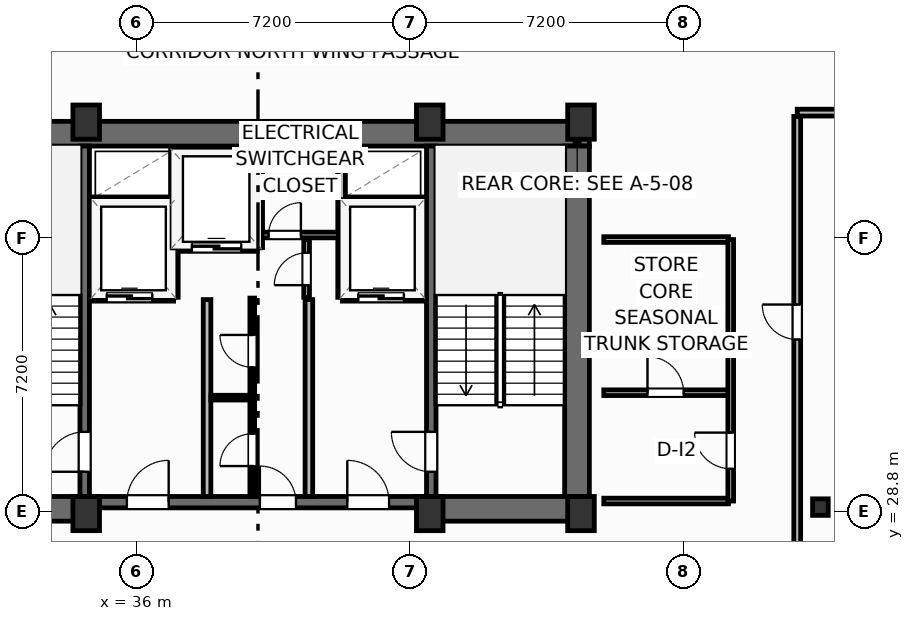
"""IFC4 building model, lengths in metres.
Left out: names, types, materials, properties, quantities, classifications, styles, units other than length and angle.
Written with IfcOpenShell. Run it as: python <this file> out.ifc"""

import sys

from ifc_helpers import new_model, si_unit, direction, frame, frame_2d, origin, origin_2d, place, context, subcontext, project, spatial, rectangle, i_section, extrude, element, fill, save


model = new_model("IFC4")
c1 = context("Model", 3, precision=1e-05, world=origin(), true_north=direction((0.0, 1.0)))
c2 = subcontext(c1, "Body", "Model", "MODEL_VIEW")
j1 = project(units=[si_unit("LENGTHUNIT", "METRE"), si_unit("PLANEANGLEUNIT", "RADIAN")], contexts=[c1])
p1 = place(None, origin())
s1 = spatial("IfcSite", under=j1, at=p1, CompositionType="ELEMENT")
p2 = place(p1, origin())
s2 = spatial("IfcBuilding", under=s1, at=p2, CompositionType="ELEMENT")
p3 = place(p2, frame((0.0, 0.0, 249.7)))
s3 = spatial("IfcBuildingStorey", under=s2, at=p3, CompositionType="ELEMENT", Elevation=249.7)
for number, where, z_axis, x_axis in (
    (1, (34.68, 28.75, 0.0), (0.0, 0.0, 1.0), (1.0, 0.0, 0.0)),
    (2, (43.72, 28.75, 0.0), (0.0, 0.0, 1.0), (1.0, 0.0, 0.0)),
    (3, (47.7, 28.75, 0.0), (0.0, 0.0, 1.0), (1.0, 0.0, 0.0)),
    (4, (34.68, 39.05, 0.0), (0.0, 0.0, 1.0), (1.0, 0.0, 0.0)),
    (5, (43.72, 39.05, 0.0), (0.0, 0.0, 1.0), (1.0, 0.0, 0.0)),
    (6, (47.7, 39.05, 0.0), (0.0, 0.0, 1.0), (1.0, 0.0, 0.0)),
):
    element("IfcColumn", number, at=place(p3, frame(where, z_axis=z_axis, x_axis=x_axis)), inside=s3, PredefinedType="COLUMN", context=c2, shape_type="SweptSolid", body=[
        extrude(rectangle(XDim=0.7, YDim=0.9, at=origin_2d()), origin(), (0.0, 0.0, 1.0), 3.7),
    ])
p4 = place(p3, frame((54.0, 28.92, 0.0), z_axis=(0.0, 0.0, 1.0), x_axis=(1.0, 0.0, 0.0)))
e7 = element("IfcColumn", 7, at=p4, inside=s3, PredefinedType="COLUMN", context=c2, shape_type="SweptSolid", body=[
    extrude(i_section(OverallWidth=0.412, OverallDepth=0.435, WebThickness=0.036, FlangeThickness=0.057, FilletRadius=0.025, at=origin_2d()), origin(), (0.0, 0.0, 1.0), 3.7),
])
p5 = place(p3, frame((30.48, 38.745, 0.0), z_axis=(0.0, 0.0, 1.0), x_axis=(1.0, 0.0, 0.0)))
e8 = element("IfcWall", 8, at=p5, inside=s3, PredefinedType="SHEAR", context=c2, shape_type="SweptSolid", body=[
    extrude(rectangle(XDim=17.44, YDim=0.65, at=frame_2d((8.72, 0.0))), origin(), (0.0, 0.0, 1.0), 3.38),
])
p6 = place(p3, frame((47.595, 29.2, 0.0), z_axis=(0.0, 0.0, 1.0), x_axis=(0.0, 1.0, 0.0)))
e9 = element("IfcWall", 9, at=p6, inside=s3, PredefinedType="SHEAR", context=c2, shape_type="SweptSolid", body=[
    extrude(rectangle(XDim=9.22, YDim=0.65, at=frame_2d((4.61, 0.0))), origin(), (0.0, 0.0, 1.0), 3.38),
])
p7 = place(p3, frame((30.48, 28.875, 0.0), z_axis=(0.0, 0.0, 1.0), x_axis=(1.0, 0.0, 0.0)))
e10 = element("IfcWall", 10, at=p7, inside=s3, PredefinedType="SHEAR", context=c2, shape_type="SweptSolid", body=[
    extrude(rectangle(XDim=4.32, YDim=0.65, at=frame_2d((2.16, 0.0))), origin(), (0.0, 0.0, 1.0), 3.38),
])
p8 = place(p3, frame((43.6, 28.875, 0.0), z_axis=(0.0, 0.0, 1.0), x_axis=(1.0, 0.0, 0.0)))
e11 = element("IfcWall", 11, at=p8, inside=s3, PredefinedType="SHEAR", context=c2, shape_type="SweptSolid", body=[
    extrude(rectangle(XDim=4.32, YDim=0.65, at=frame_2d((2.16, 0.0))), origin(), (0.0, 0.0, 1.0), 3.38),
])
p9 = place(p3, frame((34.8, 29.05, 0.0), z_axis=(0.0, 0.0, 1.0), x_axis=(1.0, 0.0, 0.0)))
e12 = element("IfcWall", 12, at=p9, inside=s3, PredefinedType="SHEAR", context=c2, shape_type="SweptSolid", body=[
    extrude(rectangle(XDim=8.8, YDim=0.3, at=frame_2d((4.4, 0.0))), origin(), (0.0, 0.0, 1.0), 3.38),
])
p10 = place(p9, frame((0.95, 0.0, 0.0)))
e13 = element("IfcOpeningElement", 13, at=p10, cuts=e12, PredefinedType="OPENING", context=c2, shape_type="SweptSolid", body=[
    extrude(rectangle(XDim=1.1, YDim=2.15, at=frame_2d((0.55, 1.075))), frame((0.0, 0.16, 0.0), z_axis=(0.0, -1.0, 0.0), x_axis=(1.0, 0.0, 0.0)), (0.0, 0.0, 1.0), 0.32),
])
p11 = place(p9, frame((6.75, 0.0, 0.0)))
e14 = element("IfcOpeningElement", 14, at=p11, cuts=e12, PredefinedType="OPENING", context=c2, shape_type="SweptSolid", body=[
    extrude(rectangle(XDim=1.1, YDim=2.15, at=frame_2d((0.55, 1.075))), frame((0.0, 0.16, 0.0), z_axis=(0.0, -1.0, 0.0), x_axis=(1.0, 0.0, 0.0)), (0.0, 0.0, 1.0), 0.32),
])
p12 = place(p9, frame((4.45, 0.0, 0.0)))
e15 = element("IfcOpeningElement", 15, at=p12, cuts=e12, PredefinedType="OPENING", context=c2, shape_type="SweptSolid", body=[
    extrude(rectangle(XDim=0.95, YDim=2.15, at=frame_2d((0.475, 1.075))), frame((0.0, 0.16, 0.0), z_axis=(0.0, -1.0, 0.0), x_axis=(1.0, 0.0, 0.0)), (0.0, 0.0, 1.0), 0.32),
])
p13 = place(p3, frame((34.64, 29.2, 0.0), z_axis=(0.0, 0.0, 1.0), x_axis=(0.0, 1.0, 0.0)))
e16 = element("IfcWall", 16, at=p13, inside=s3, PredefinedType="SHEAR", context=c2, shape_type="SweptSolid", body=[
    extrude(rectangle(XDim=9.22, YDim=0.25, at=frame_2d((4.61, 0.0))), origin(), (0.0, 0.0, 1.0), 3.38),
])
p14 = place(p13, frame((0.65, 0.0, 0.0)))
e17 = element("IfcOpeningElement", 17, at=p14, cuts=e16, PredefinedType="OPENING", context=c2, shape_type="SweptSolid", body=[
    extrude(rectangle(XDim=1.05, YDim=2.15, at=frame_2d((0.525, 1.075))), frame((0.0, 0.135, 0.0), z_axis=(0.0, -1.0, 0.0), x_axis=(1.0, 0.0, 0.0)), (0.0, 0.0, 1.0), 0.27),
])
p15 = place(p3, frame((43.76, 29.2, 0.0), z_axis=(0.0, 0.0, 1.0), x_axis=(0.0, 1.0, 0.0)))
e18 = element("IfcWall", 18, at=p15, inside=s3, PredefinedType="SHEAR", context=c2, shape_type="SweptSolid", body=[
    extrude(rectangle(XDim=9.22, YDim=0.25, at=frame_2d((4.61, 0.0))), origin(), (0.0, 0.0, 1.0), 3.38),
])
p16 = place(p15, frame((0.65, 0.0, 0.0)))
e19 = element("IfcOpeningElement", 19, at=p16, cuts=e18, PredefinedType="OPENING", context=c2, shape_type="SweptSolid", body=[
    extrude(rectangle(XDim=1.05, YDim=2.15, at=frame_2d((0.525, 1.075))), frame((0.0, 0.135, 0.0), z_axis=(0.0, -1.0, 0.0), x_axis=(1.0, 0.0, 0.0)), (0.0, 0.0, 1.0), 0.27),
])
p17 = place(p3, frame((53.39, 27.53, 0.0), z_axis=(0.0, 0.0, 1.0), x_axis=(0.0, 1.0, 0.0)))
e20 = element("IfcWall", 20, at=p17, inside=s3, PredefinedType="PARTITIONING", context=c2, shape_type="SweptSolid", body=[
    extrude(rectangle(XDim=11.67, YDim=0.18, at=frame_2d((5.835, 0.0))), origin(), (0.0, 0.0, 1.0), 3.38),
])
p18 = place(p17, frame((5.8, 0.0, 0.0)))
e21 = element("IfcOpeningElement", 21, at=p18, cuts=e20, PredefinedType="OPENING", context=c2, shape_type="SweptSolid", body=[
    extrude(rectangle(XDim=0.92, YDim=2.05, at=frame_2d((0.46, 1.025))), frame((0.0, 0.1, 0.0), z_axis=(0.0, -1.0, 0.0), x_axis=(1.0, 0.0, 0.0)), (0.0, 0.0, 1.0), 0.2),
])
p19 = place(p3, frame((53.39, 39.3, 0.0), z_axis=(0.0, 0.0, 1.0), x_axis=(1.0, 0.0, 0.0)))
e22 = element("IfcWall", 22, at=p19, inside=s3, PredefinedType="PARTITIONING", context=c2, shape_type="SweptSolid", body=[
    extrude(rectangle(XDim=15.713, YDim=0.18, at=frame_2d((7.856, 0.0))), origin(), (0.0, 0.0, 1.0), 3.38),
])
for number, where, z_axis, x_axis in (
    (23, (37.86, 29.2, 0.0), (0.0, 0.0, 1.0), (0.0, 1.0, 0.0)),
    (24, (40.54, 29.2, 0.0), (0.0, 0.0, 1.0), (0.0, 1.0, 0.0)),
):
    element("IfcWall", number, at=place(p3, frame(where, z_axis=z_axis, x_axis=x_axis)), inside=s3, PredefinedType="PARTITIONING", context=c2, shape_type="SweptSolid", body=[
        extrude(rectangle(XDim=5.18, YDim=0.2, at=frame_2d((2.59, 0.0))), origin(), (0.0, 0.0, 1.0), 3.38),
    ])
p20 = place(p3, frame((34.8, 34.44, 0.0), z_axis=(0.0, 0.0, 1.0), x_axis=(1.0, 0.0, 0.0)))
e25 = element("IfcWall", 25, at=p20, inside=s3, PredefinedType="PARTITIONING", context=c2, shape_type="SweptSolid", body=[
    extrude(rectangle(XDim=2.18, YDim=0.2, at=frame_2d((1.09, 0.0))), origin(), (0.0, 0.0, 1.0), 3.38),
])
p21 = place(p20, frame((0.42, 0.0, 0.0)))
e26 = element("IfcOpeningElement", 26, at=p21, cuts=e25, PredefinedType="OPENING", context=c2, shape_type="SweptSolid", body=[
    extrude(rectangle(XDim=1.2, YDim=2.2, at=frame_2d((0.6, 1.1))), frame((0.0, 0.11, 0.0), z_axis=(0.0, -1.0, 0.0), x_axis=(1.0, 0.0, 0.0)), (0.0, 0.0, 1.0), 0.22),
])
p22 = place(p3, frame((34.8, 36.98, 0.0), z_axis=(0.0, 0.0, 1.0), x_axis=(1.0, 0.0, 0.0)))
e27 = element("IfcWall", 27, at=p22, inside=s3, PredefinedType="PARTITIONING", context=c2, shape_type="SweptSolid", body=[
    extrude(rectangle(XDim=2.18, YDim=0.2, at=frame_2d((1.09, 0.0))), origin(), (0.0, 0.0, 1.0), 3.38),
])
p23 = place(p3, frame((37.0, 34.44, 0.0), z_axis=(0.0, 0.0, 1.0), x_axis=(0.0, 1.0, 0.0)))
e28 = element("IfcWall", 28, at=p23, inside=s3, PredefinedType="PARTITIONING", context=c2, shape_type="SweptSolid", body=[
    extrude(rectangle(XDim=3.9, YDim=0.2, at=frame_2d((1.95, 0.0))), origin(), (0.0, 0.0, 1.0), 3.38),
])
p24 = place(p3, frame((41.42, 34.44, 0.0), z_axis=(0.0, 0.0, 1.0), x_axis=(1.0, 0.0, 0.0)))
e29 = element("IfcWall", 29, at=p24, inside=s3, PredefinedType="PARTITIONING", context=c2, shape_type="SweptSolid", body=[
    extrude(rectangle(XDim=2.18, YDim=0.2, at=frame_2d((1.09, 0.0))), origin(), (0.0, 0.0, 1.0), 3.38),
])
p25 = place(p24, frame((0.42, 0.0, 0.0)))
e30 = element("IfcOpeningElement", 30, at=p25, cuts=e29, PredefinedType="OPENING", context=c2, shape_type="SweptSolid", body=[
    extrude(rectangle(XDim=1.2, YDim=2.2, at=frame_2d((0.6, 1.1))), frame((0.0, 0.11, 0.0), z_axis=(0.0, -1.0, 0.0), x_axis=(1.0, 0.0, 0.0)), (0.0, 0.0, 1.0), 0.22),
])
p26 = place(p3, frame((41.42, 36.98, 0.0), z_axis=(0.0, 0.0, 1.0), x_axis=(1.0, 0.0, 0.0)))
e31 = element("IfcWall", 31, at=p26, inside=s3, PredefinedType="PARTITIONING", context=c2, shape_type="SweptSolid", body=[
    extrude(rectangle(XDim=2.18, YDim=0.2, at=frame_2d((1.09, 0.0))), origin(), (0.0, 0.0, 1.0), 3.38),
])
p27 = place(p3, frame((41.4, 34.44, 0.0), z_axis=(0.0, 0.0, 1.0), x_axis=(0.0, 1.0, 0.0)))
e32 = element("IfcWall", 32, at=p27, inside=s3, PredefinedType="PARTITIONING", context=c2, shape_type="SweptSolid", body=[
    extrude(rectangle(XDim=3.9, YDim=0.2, at=frame_2d((1.95, 0.0))), origin(), (0.0, 0.0, 1.0), 3.38),
])
p28 = place(p3, frame((37.06, 35.75, 0.0), z_axis=(0.0, 0.0, 1.0), x_axis=(1.0, 0.0, 0.0)))
e33 = element("IfcWall", 33, at=p28, inside=s3, PredefinedType="PARTITIONING", context=c2, shape_type="SweptSolid", body=[
    extrude(rectangle(XDim=2.12, YDim=0.2, at=frame_2d((1.06, 0.0))), origin(), (0.0, 0.0, 1.0), 3.38),
])
p29 = place(p28, frame((0.4, 0.0, 0.0)))
e34 = element("IfcOpeningElement", 34, at=p29, cuts=e33, PredefinedType="OPENING", context=c2, shape_type="SweptSolid", body=[
    extrude(rectangle(XDim=1.3, YDim=2.2, at=frame_2d((0.65, 1.1))), frame((0.0, 0.11, 0.0), z_axis=(0.0, -1.0, 0.0), x_axis=(1.0, 0.0, 0.0)), (0.0, 0.0, 1.0), 0.22),
])
p30 = place(p3, frame((39.22, 35.75, 0.0), z_axis=(0.0, 0.0, 1.0), x_axis=(0.0, 1.0, 0.0)))
e35 = element("IfcWall", 35, at=p30, inside=s3, PredefinedType="PARTITIONING", context=c2, shape_type="SweptSolid", body=[
    extrude(rectangle(XDim=2.59, YDim=0.2, at=frame_2d((1.295, 0.0))), origin(), (0.0, 0.0, 1.0), 3.38),
])
p31 = place(p3, frame((39.3, 36.08, 0.0), z_axis=(0.0, 0.0, 1.0), x_axis=(1.0, 0.0, 0.0)))
e36 = element("IfcWall", 36, at=p31, inside=s3, PredefinedType="PARTITIONING", context=c2, shape_type="SweptSolid", body=[
    extrude(rectangle(XDim=2.02, YDim=0.15, at=frame_2d((1.01, 0.0))), origin(), (0.0, 0.0, 1.0), 3.38),
])
p32 = place(p31, frame((0.18, 0.0, 0.0)))
e37 = element("IfcOpeningElement", 37, at=p32, cuts=e36, PredefinedType="OPENING", context=c2, shape_type="SweptSolid", body=[
    extrude(rectangle(XDim=0.85, YDim=2.05, at=frame_2d((0.425, 1.025))), frame((0.0, 0.085, 0.0), z_axis=(0.0, -1.0, 0.0), x_axis=(1.0, 0.0, 0.0)), (0.0, 0.0, 1.0), 0.17),
])
p33 = place(p3, frame((40.48, 34.44, 0.0), z_axis=(0.0, 0.0, 1.0), x_axis=(0.0, 1.0, 0.0)))
e38 = element("IfcWall", 38, at=p33, inside=s3, PredefinedType="PARTITIONING", context=c2, shape_type="SweptSolid", body=[
    extrude(rectangle(XDim=1.52, YDim=0.15, at=frame_2d((0.76, 0.0))), origin(), (0.0, 0.0, 1.0), 3.38),
])
p34 = place(p33, frame((0.32, 0.0, 0.0)))
e39 = element("IfcOpeningElement", 39, at=p34, cuts=e38, PredefinedType="OPENING", context=c2, shape_type="SweptSolid", body=[
    extrude(rectangle(XDim=0.85, YDim=2.05, at=frame_2d((0.425, 1.025))), frame((0.0, 0.085, 0.0), z_axis=(0.0, -1.0, 0.0), x_axis=(1.0, 0.0, 0.0)), (0.0, 0.0, 1.0), 0.17),
])
p35 = place(p3, frame((37.96, 31.8, 0.0), z_axis=(0.0, 0.0, 1.0), x_axis=(1.0, 0.0, 0.0)))
e40 = element("IfcWall", 40, at=p35, inside=s3, PredefinedType="PARTITIONING", context=c2, shape_type="SweptSolid", body=[
    extrude(rectangle(XDim=1.09, YDim=0.125, at=frame_2d((0.545, 0.0))), origin(), (0.0, 0.0, 1.0), 3.38),
])
p36 = place(p3, frame((39.05, 29.2, 0.0), z_axis=(0.0, 0.0, 1.0), x_axis=(0.0, 1.0, 0.0)))
e41 = element("IfcWall", 41, at=p36, inside=s3, PredefinedType="PARTITIONING", context=c2, shape_type="SweptSolid", body=[
    extrude(rectangle(XDim=5.22, YDim=0.125, at=frame_2d((2.61, 0.0))), origin(), (0.0, 0.0, 1.0), 3.38),
])
p37 = place(p36, frame((0.8, 0.0, 0.0)))
e42 = element("IfcOpeningElement", 42, at=p37, cuts=e41, PredefinedType="OPENING", context=c2, shape_type="SweptSolid", body=[
    extrude(rectangle(XDim=0.85, YDim=2.05, at=frame_2d((0.425, 1.025))), frame((0.0, 0.073, 0.0), z_axis=(0.0, -1.0, 0.0), x_axis=(1.0, 0.0, 0.0)), (0.0, 0.0, 1.0), 0.145),
])
p38 = place(p36, frame((3.4, 0.0, 0.0)))
e43 = element("IfcOpeningElement", 43, at=p38, cuts=e41, PredefinedType="OPENING", context=c2, shape_type="SweptSolid", body=[
    extrude(rectangle(XDim=0.85, YDim=2.05, at=frame_2d((0.425, 1.025))), frame((0.0, 0.073, 0.0), z_axis=(0.0, -1.0, 0.0), x_axis=(1.0, 0.0, 0.0)), (0.0, 0.0, 1.0), 0.145),
])
p39 = place(p3, frame((48.3, 31.93, 0.0), z_axis=(0.0, 0.0, 1.0), x_axis=(1.0, 0.0, 0.0)))
e44 = element("IfcWall", 44, at=p39, inside=s3, PredefinedType="PARTITIONING", context=c2, shape_type="SweptSolid", body=[
    extrude(rectangle(XDim=3.28, YDim=0.15, at=frame_2d((1.64, 0.0))), origin(), (0.0, 0.0, 1.0), 3.38),
])
p40 = place(p39, frame((1.15, 0.0, 0.0)))
e45 = element("IfcOpeningElement", 45, at=p40, cuts=e44, PredefinedType="OPENING", context=c2, shape_type="SweptSolid", body=[
    extrude(rectangle(XDim=0.95, YDim=2.05, at=frame_2d((0.475, 1.025))), frame((0.0, 0.085, 0.0), z_axis=(0.0, -1.0, 0.0), x_axis=(1.0, 0.0, 0.0)), (0.0, 0.0, 1.0), 0.17),
])
p41 = place(p3, frame((48.3, 29.08, 0.0), z_axis=(0.0, 0.0, 1.0), x_axis=(1.0, 0.0, 0.0)))
e46 = element("IfcWall", 46, at=p41, inside=s3, PredefinedType="PARTITIONING", context=c2, shape_type="SweptSolid", body=[
    extrude(rectangle(XDim=3.28, YDim=0.15, at=frame_2d((1.64, 0.0))), origin(), (0.0, 0.0, 1.0), 2.592),
])
p42 = place(p3, frame((48.3, 35.96, 0.0), z_axis=(0.0, 0.0, 1.0), x_axis=(1.0, 0.0, 0.0)))
e47 = element("IfcWall", 47, at=p42, inside=s3, PredefinedType="PARTITIONING", context=c2, shape_type="SweptSolid", body=[
    extrude(rectangle(XDim=3.28, YDim=0.15, at=frame_2d((1.64, 0.0))), origin(), (0.0, 0.0, 1.0), 3.38),
])
p43 = place(p3, frame((51.64, 29.08, 0.0), z_axis=(0.0, 0.0, 1.0), x_axis=(0.0, 1.0, 0.0)))
e48 = element("IfcWall", 48, at=p43, inside=s3, PredefinedType="PARTITIONING", context=c2, shape_type="SweptSolid", body=[
    extrude(rectangle(XDim=6.88, YDim=0.15, at=frame_2d((3.44, 0.0))), origin(), (0.0, 0.0, 1.0), 3.38),
])
p44 = place(p43, frame((0.85, 0.0, 0.0)))
e49 = element("IfcOpeningElement", 49, at=p44, cuts=e48, PredefinedType="OPENING", context=c2, shape_type="SweptSolid", body=[
    extrude(rectangle(XDim=0.95, YDim=2.05, at=frame_2d((0.475, 1.025))), frame((0.0, 0.085, 0.0), z_axis=(0.0, -1.0, 0.0), x_axis=(1.0, 0.0, 0.0)), (0.0, 0.0, 1.0), 0.17),
])
p45 = place(p18, origin())
e50 = element("IfcDoor", 50, at=p45, inside=s3, OperationType="SINGLE_SWING_RIGHT", PredefinedType="DOOR", context=c2, shape_type="SweptSolid", body=[
    extrude(rectangle(XDim=0.92, YDim=2.05, at=frame_2d((0.46, 1.025))), frame((0.0, 0.025, 0.0), z_axis=(0.0, -1.0, 0.0), x_axis=(1.0, 0.0, 0.0)), (0.0, 0.0, 1.0), 0.05),
])
fill(e21, e50)
p46 = place(p14, origin())
e51 = element("IfcDoor", 51, at=p46, inside=s3, OperationType="SINGLE_SWING_LEFT", PredefinedType="DOOR", context=c2, shape_type="SweptSolid", body=[
    extrude(rectangle(XDim=1.05, YDim=2.15, at=frame_2d((0.525, 1.075))), frame((0.0, 0.025, 0.0), z_axis=(0.0, -1.0, 0.0), x_axis=(1.0, 0.0, 0.0)), (0.0, 0.0, 1.0), 0.05),
])
fill(e17, e51)
p47 = place(p16, origin())
e52 = element("IfcDoor", 52, at=p47, inside=s3, OperationType="SINGLE_SWING_RIGHT", PredefinedType="DOOR", context=c2, shape_type="SweptSolid", body=[
    extrude(rectangle(XDim=1.05, YDim=2.15, at=frame_2d((0.525, 1.075))), frame((0.0, 0.025, 0.0), z_axis=(0.0, -1.0, 0.0), x_axis=(1.0, 0.0, 0.0)), (0.0, 0.0, 1.0), 0.05),
])
fill(e19, e52)
p48 = place(p10, origin())
e53 = element("IfcDoor", 53, at=p48, inside=s3, OperationType="SINGLE_SWING_RIGHT", PredefinedType="DOOR", context=c2, shape_type="SweptSolid", body=[
    extrude(rectangle(XDim=1.1, YDim=2.15, at=frame_2d((0.55, 1.075))), frame((0.0, 0.025, 0.0), z_axis=(0.0, -1.0, 0.0), x_axis=(1.0, 0.0, 0.0)), (0.0, 0.0, 1.0), 0.05),
])
fill(e13, e53)
p49 = place(p11, origin())
e54 = element("IfcDoor", 54, at=p49, inside=s3, OperationType="SINGLE_SWING_LEFT", PredefinedType="DOOR", context=c2, shape_type="SweptSolid", body=[
    extrude(rectangle(XDim=1.1, YDim=2.15, at=frame_2d((0.55, 1.075))), frame((0.0, 0.025, 0.0), z_axis=(0.0, -1.0, 0.0), x_axis=(1.0, 0.0, 0.0)), (0.0, 0.0, 1.0), 0.05),
])
fill(e14, e54)
p50 = place(p21, origin())
e55 = element("IfcDoor", 55, at=p50, inside=s3, OperationType="SLIDING_TO_LEFT", PredefinedType="DOOR", context=c2, shape_type="SweptSolid", body=[
    extrude(rectangle(XDim=1.2, YDim=2.2, at=frame_2d((0.6, 1.1))), frame((0.0, 0.025, 0.0), z_axis=(0.0, -1.0, 0.0), x_axis=(1.0, 0.0, 0.0)), (0.0, 0.0, 1.0), 0.05),
])
fill(e26, e55)
p51 = place(p25, origin())
e56 = element("IfcDoor", 56, at=p51, inside=s3, OperationType="SLIDING_TO_LEFT", PredefinedType="DOOR", context=c2, shape_type="SweptSolid", body=[
    extrude(rectangle(XDim=1.2, YDim=2.2, at=frame_2d((0.6, 1.1))), frame((0.0, 0.025, 0.0), z_axis=(0.0, -1.0, 0.0), x_axis=(1.0, 0.0, 0.0)), (0.0, 0.0, 1.0), 0.05),
])
fill(e30, e56)
p52 = place(p29, origin())
e57 = element("IfcDoor", 57, at=p52, inside=s3, OperationType="SLIDING_TO_LEFT", PredefinedType="DOOR", context=c2, shape_type="SweptSolid", body=[
    extrude(rectangle(XDim=1.3, YDim=2.2, at=frame_2d((0.65, 1.1))), frame((0.0, 0.025, 0.0), z_axis=(0.0, -1.0, 0.0), x_axis=(1.0, 0.0, 0.0)), (0.0, 0.0, 1.0), 0.05),
])
fill(e34, e57)
p53 = place(p32, origin())
e58 = element("IfcDoor", 58, at=p53, inside=s3, OperationType="SINGLE_SWING_RIGHT", PredefinedType="DOOR", context=c2, shape_type="SweptSolid", body=[
    extrude(rectangle(XDim=0.85, YDim=2.05, at=frame_2d((0.425, 1.025))), frame((0.0, 0.025, 0.0), z_axis=(0.0, -1.0, 0.0), x_axis=(1.0, 0.0, 0.0)), (0.0, 0.0, 1.0), 0.05),
])
fill(e37, e58)
p54 = place(p34, origin())
e59 = element("IfcDoor", 59, at=p54, inside=s3, OperationType="SINGLE_SWING_LEFT", PredefinedType="DOOR", context=c2, shape_type="SweptSolid", body=[
    extrude(rectangle(XDim=0.85, YDim=2.05, at=frame_2d((0.425, 1.025))), frame((0.0, 0.025, 0.0), z_axis=(0.0, -1.0, 0.0), x_axis=(1.0, 0.0, 0.0)), (0.0, 0.0, 1.0), 0.05),
])
fill(e39, e59)
p55 = place(p37, origin())
e60 = element("IfcDoor", 60, at=p55, inside=s3, OperationType="SINGLE_SWING_LEFT", PredefinedType="DOOR", context=c2, shape_type="SweptSolid", body=[
    extrude(rectangle(XDim=0.85, YDim=2.05, at=frame_2d((0.425, 1.025))), frame((0.0, 0.025, 0.0), z_axis=(0.0, -1.0, 0.0), x_axis=(1.0, 0.0, 0.0)), (0.0, 0.0, 1.0), 0.05),
])
fill(e42, e60)
p56 = place(p38, origin())
e61 = element("IfcDoor", 61, at=p56, inside=s3, OperationType="SINGLE_SWING_RIGHT", PredefinedType="DOOR", context=c2, shape_type="SweptSolid", body=[
    extrude(rectangle(XDim=0.85, YDim=2.05, at=frame_2d((0.425, 1.025))), frame((0.0, 0.025, 0.0), z_axis=(0.0, -1.0, 0.0), x_axis=(1.0, 0.0, 0.0)), (0.0, 0.0, 1.0), 0.05),
])
fill(e43, e61)
p57 = place(p12, origin())
e62 = element("IfcDoor", 62, at=p57, inside=s3, OperationType="SINGLE_SWING_LEFT", PredefinedType="DOOR", context=c2, shape_type="SweptSolid", body=[
    extrude(rectangle(XDim=0.95, YDim=2.15, at=frame_2d((0.475, 1.075))), frame((0.0, 0.025, 0.0), z_axis=(0.0, -1.0, 0.0), x_axis=(1.0, 0.0, 0.0)), (0.0, 0.0, 1.0), 0.05),
])
fill(e15, e62)
p58 = place(p40, origin())
e63 = element("IfcDoor", 63, at=p58, inside=s3, OperationType="SINGLE_SWING_LEFT", PredefinedType="DOOR", context=c2, shape_type="SweptSolid", body=[
    extrude(rectangle(XDim=0.95, YDim=2.05, at=frame_2d((0.475, 1.025))), frame((0.0, 0.025, 0.0), z_axis=(0.0, -1.0, 0.0), x_axis=(1.0, 0.0, 0.0)), (0.0, 0.0, 1.0), 0.05),
])
fill(e45, e63)
p59 = place(p44, origin())
e64 = element("IfcDoor", 64, at=p59, inside=s3, OperationType="SINGLE_SWING_RIGHT", PredefinedType="DOOR", context=c2, shape_type="SweptSolid", body=[
    extrude(rectangle(XDim=0.95, YDim=2.05, at=frame_2d((0.475, 1.025))), frame((0.0, 0.025, 0.0), z_axis=(0.0, -1.0, 0.0), x_axis=(1.0, 0.0, 0.0)), (0.0, 0.0, 1.0), 0.05),
])
fill(e49, e64)
save(model, sys.argv[1])
